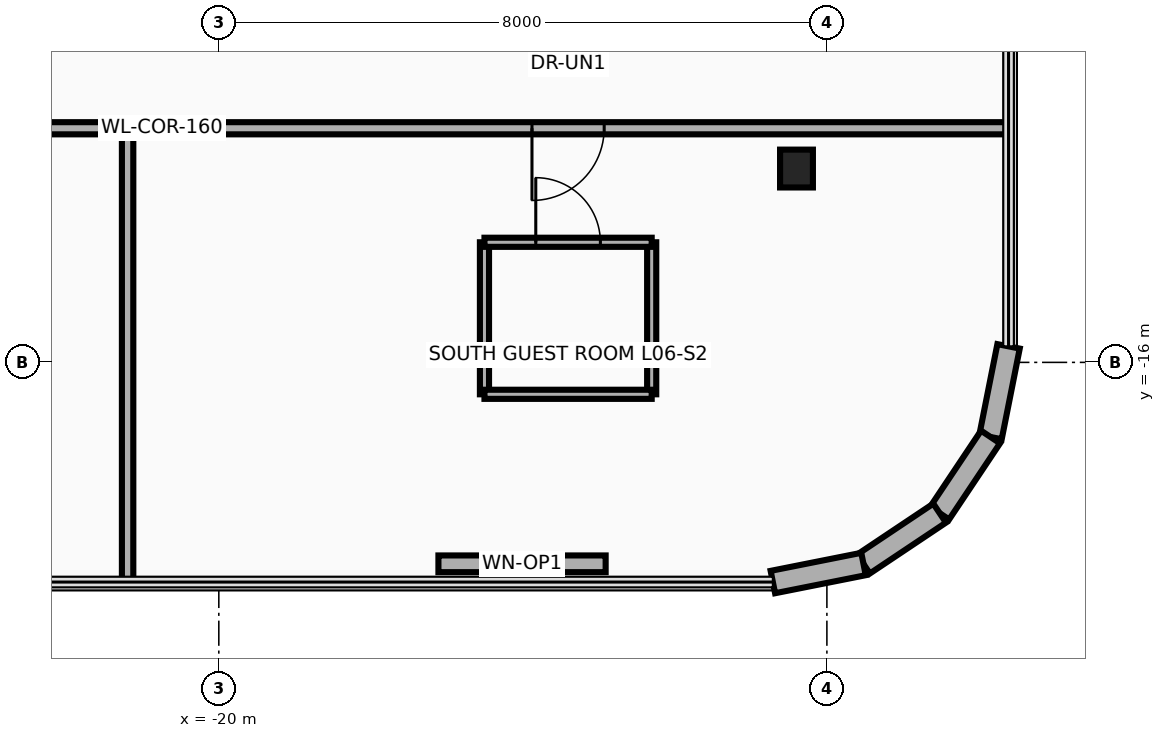
"""IFC4 building model, lengths in metres.
Left out: names, types, materials, properties, quantities, classifications, styles, units other than length and angle.
Written with IfcOpenShell. Run it as: python <this file> out.ifc"""

import sys

from ifc_helpers import new_model, si_unit, direction, frame, frame_2d, origin, origin_2d, place, context, subcontext, project, spatial, rectangle, i_section, extrude, source, transform, mapped, element, fill, save


model = new_model("IFC4")
c1 = context("Model", 3, precision=1e-05, world=origin(), true_north=direction((0.0, 1.0)))
c2 = subcontext(c1, "Body", "Model", "MODEL_VIEW")
j1 = project(units=[si_unit("LENGTHUNIT", "METRE"), si_unit("PLANEANGLEUNIT", "RADIAN")], contexts=[c1])
p1 = place(None, origin())
s1 = spatial("IfcSite", under=j1, at=p1, CompositionType="ELEMENT")
p2 = place(p1, origin())
s2 = spatial("IfcBuilding", under=s1, at=p2, CompositionType="ELEMENT")
p3 = place(p2, frame((0.0, 0.0, 29.7)))
s3 = spatial("IfcBuildingStorey", under=s2, at=p3, CompositionType="ELEMENT", Elevation=29.7)
m1 = source(origin(), c2, "Body", "SweptSolid", [
    extrude(i_section(OverallWidth=0.432, OverallDepth=0.498, WebThickness=0.056, FlangeThickness=0.089, at=origin_2d()), origin(), (0.0, 0.0, 1.0), 3.7),
])
p4 = place(p3, frame((-12.4, -13.45, 0.0), z_axis=(0.0, 0.0, 1.0), x_axis=(1.0, 0.0, 0.0)))
e1 = element("IfcColumn", 1, at=p4, inside=s3, PredefinedType="COLUMN", context=c2, shape_type="MappedRepresentation", body=[
    mapped(m1, transform((0.0, 0.0, 0.0), x_axis=(1.0, 0.0, 0.0), y_axis=(0.0, 1.0, 0.0), z_axis=(0.0, 0.0, 1.0), scale=1.0)),
])
p5 = place(p3, frame((-9.61, -15.789, 0.0), z_axis=(0.0, 0.0, 1.0), x_axis=(-0.194996050505, -0.980804027463, 0.0)))
e2 = element("IfcWall", 2, at=p5, inside=s3, PredefinedType="SOLIDWALL", context=c2, shape_type="SweptSolid", body=[
    extrude(rectangle(XDim=1.216, YDim=0.3, at=frame_2d((0.608, 0.0))), origin(), (0.0, 0.0, 1.0), 3.46),
])
for number, where, z_axis, x_axis in (
    (3, (-9.847, -16.982, 0.0), (0.0, 0.0, 1.0), (-0.556, -0.831, 0.0)),
    (4, (-10.517, -17.983, 0.0), (0.0, 0.0, 1.0), (-0.831, -0.556, 0.0)),
):
    element("IfcWall", number, at=place(p3, frame(where, z_axis=z_axis, x_axis=x_axis)), inside=s3, PredefinedType="SOLIDWALL", context=c2, shape_type="SweptSolid", body=[
        extrude(rectangle(XDim=1.205, YDim=0.3, at=frame_2d((0.603, 0.0))), origin(), (0.0, 0.0, 1.0), 3.46),
    ])
p6 = place(p3, frame((-11.518, -18.653, 0.0), z_axis=(0.0, 0.0, 1.0), x_axis=(-0.980804027463, -0.194996050505, 0.0)))
e5 = element("IfcWall", 5, at=p6, inside=s3, PredefinedType="SOLIDWALL", context=c2, shape_type="SweptSolid", body=[
    extrude(rectangle(XDim=1.216, YDim=0.3, at=frame_2d((0.608, 0.0))), origin(), (0.0, 0.0, 1.0), 3.46),
])
p7 = place(p3, frame((-14.911, -18.65, 0.0), z_axis=(0.0, 0.0, 1.0), x_axis=(-1.0, 0.0, 0.0)))
e6 = element("IfcWall", 6, at=p7, inside=s3, PredefinedType="SOLIDWALL", context=c2, shape_type="SweptSolid", body=[
    extrude(rectangle(XDim=2.2, YDim=0.22, at=frame_2d((1.1, 0.0))), origin(), (0.0, 0.0, 1.0), 3.46),
])
p8 = place(p7, frame((0.65, 0.0, 0.95)))
e7 = element("IfcOpeningElement", 7, at=p8, cuts=e6, PredefinedType="OPENING", context=c2, shape_type="SweptSolid", body=[
    extrude(rectangle(XDim=0.9, YDim=1.3, at=frame_2d((0.45, 0.65))), frame((0.0, 0.125, 0.0), z_axis=(0.0, -1.0, 0.0), x_axis=(1.0, 0.0, 0.0)), (0.0, 0.0, 1.0), 0.25),
])
p9 = place(p3, frame((-31.89, -12.92, 0.0), z_axis=(0.0, 0.0, 1.0), x_axis=(1.0, 0.0, 0.0)))
e8 = element("IfcWall", 8, at=p9, inside=s3, PredefinedType="PARTITIONING", context=c2, shape_type="SweptSolid", body=[
    extrude(rectangle(XDim=22.28, YDim=0.16, at=frame_2d((11.14, 0.0))), origin(), (0.0, 0.0, 1.0), 2.834),
])
p10 = place(p9, frame((5.97, 0.0, 0.0)))
e9 = element("IfcOpeningElement", 9, at=p10, cuts=e8, PredefinedType="OPENING", context=c2, shape_type="SweptSolid", body=[
    extrude(rectangle(XDim=0.95, YDim=2.15, at=frame_2d((0.475, 1.075))), frame((0.0, 0.095, 0.0), z_axis=(0.0, -1.0, 0.0), x_axis=(1.0, 0.0, 0.0)), (0.0, 0.0, 1.0), 0.19),
])
p11 = place(p9, frame((16.01, 0.0, 0.0)))
e10 = element("IfcOpeningElement", 10, at=p11, cuts=e8, PredefinedType="OPENING", context=c2, shape_type="SweptSolid", body=[
    extrude(rectangle(XDim=0.95, YDim=2.15, at=frame_2d((0.475, 1.075))), frame((0.0, 0.095, 0.0), z_axis=(0.0, -1.0, 0.0), x_axis=(1.0, 0.0, 0.0)), (0.0, 0.0, 1.0), 0.19),
])
p12 = place(p3, frame((-21.2, -18.89, 0.0), z_axis=(0.0, 0.0, 1.0), x_axis=(0.0, 1.0, 0.0)))
e11 = element("IfcWall", 11, at=p12, inside=s3, PredefinedType="PARTITIONING", context=c2, shape_type="SweptSolid", body=[
    extrude(rectangle(XDim=5.97, YDim=0.15, at=frame_2d((2.985, 0.0))), origin(), (0.0, 0.0, 1.0), 2.896),
])
for number, where, z_axis, x_axis in (
    (12, (-16.505, -16.42, 0.0), (0.0, 0.0, 1.0), (0.0, 1.0, 0.0)),
    (13, (-14.305, -16.42, 0.0), (0.0, 0.0, 1.0), (0.0, 1.0, 0.0)),
):
    element("IfcWall", number, at=place(p3, frame(where, z_axis=z_axis, x_axis=x_axis)), inside=s3, PredefinedType="PARTITIONING", context=c2, shape_type="SweptSolid", body=[
        extrude(rectangle(XDim=2.0, YDim=0.12, at=frame_2d((1.0, 0.0))), origin(), (0.0, 0.0, 1.0), 3.46),
    ])
p13 = place(p3, frame((-16.505, -16.42, 0.0), z_axis=(0.0, 0.0, 1.0), x_axis=(1.0, 0.0, 0.0)))
e14 = element("IfcWall", 14, at=p13, inside=s3, PredefinedType="PARTITIONING", context=c2, shape_type="SweptSolid", body=[
    extrude(rectangle(XDim=2.2, YDim=0.12, at=frame_2d((1.1, 0.0))), origin(), (0.0, 0.0, 1.0), 3.46),
])
p14 = place(p3, frame((-16.505, -14.42, 0.0), z_axis=(0.0, 0.0, 1.0), x_axis=(1.0, 0.0, 0.0)))
e15 = element("IfcWall", 15, at=p14, inside=s3, PredefinedType="PARTITIONING", context=c2, shape_type="SweptSolid", body=[
    extrude(rectangle(XDim=2.2, YDim=0.12, at=frame_2d((1.1, 0.0))), origin(), (0.0, 0.0, 1.0), 3.46),
])
p15 = place(p14, frame((0.675, 0.0, 0.0)))
e16 = element("IfcOpeningElement", 16, at=p15, cuts=e15, PredefinedType="OPENING", context=c2, shape_type="SweptSolid", body=[
    extrude(rectangle(XDim=0.85, YDim=2.1, at=frame_2d((0.425, 1.05))), frame((0.0, 0.075, 0.0), z_axis=(0.0, -1.0, 0.0), x_axis=(1.0, 0.0, 0.0)), (0.0, 0.0, 1.0), 0.15),
])
p16 = place(p8, origin())
e17 = element("IfcWindow", 17, at=p16, inside=s3, PartitioningType="SINGLE_PANEL", PredefinedType="WINDOW", context=c2, shape_type="SweptSolid", body=[
    extrude(rectangle(XDim=0.9, YDim=1.3, at=frame_2d((0.45, 0.65))), frame((0.0, 0.03, 0.0), z_axis=(0.0, -1.0, 0.0), x_axis=(1.0, 0.0, 0.0)), (0.0, 0.0, 1.0), 0.06),
])
fill(e7, e17)
p17 = place(p11, frame((0.95, 0.0, 0.0), z_axis=(0.0, 0.0, 1.0), x_axis=(-1.0, 0.0, 0.0)))
e18 = element("IfcDoor", 18, at=p17, inside=s3, OperationType="SINGLE_SWING_LEFT", PredefinedType="DOOR", context=c2, shape_type="SweptSolid", body=[
    extrude(rectangle(XDim=0.95, YDim=2.15, at=frame_2d((0.475, 1.075))), frame((0.0, 0.025, 0.0), z_axis=(0.0, -1.0, 0.0), x_axis=(1.0, 0.0, 0.0)), (0.0, 0.0, 1.0), 0.05),
])
fill(e10, e18)
p18 = place(p15, origin())
e19 = element("IfcDoor", 19, at=p18, inside=s3, OperationType="SINGLE_SWING_RIGHT", PredefinedType="DOOR", context=c2, shape_type="SweptSolid", body=[
    extrude(rectangle(XDim=0.85, YDim=2.1, at=frame_2d((0.425, 1.05))), frame((0.0, 0.025, 0.0), z_axis=(0.0, -1.0, 0.0), x_axis=(1.0, 0.0, 0.0)), (0.0, 0.0, 1.0), 0.05),
])
fill(e16, e19)
save(model, sys.argv[1])
